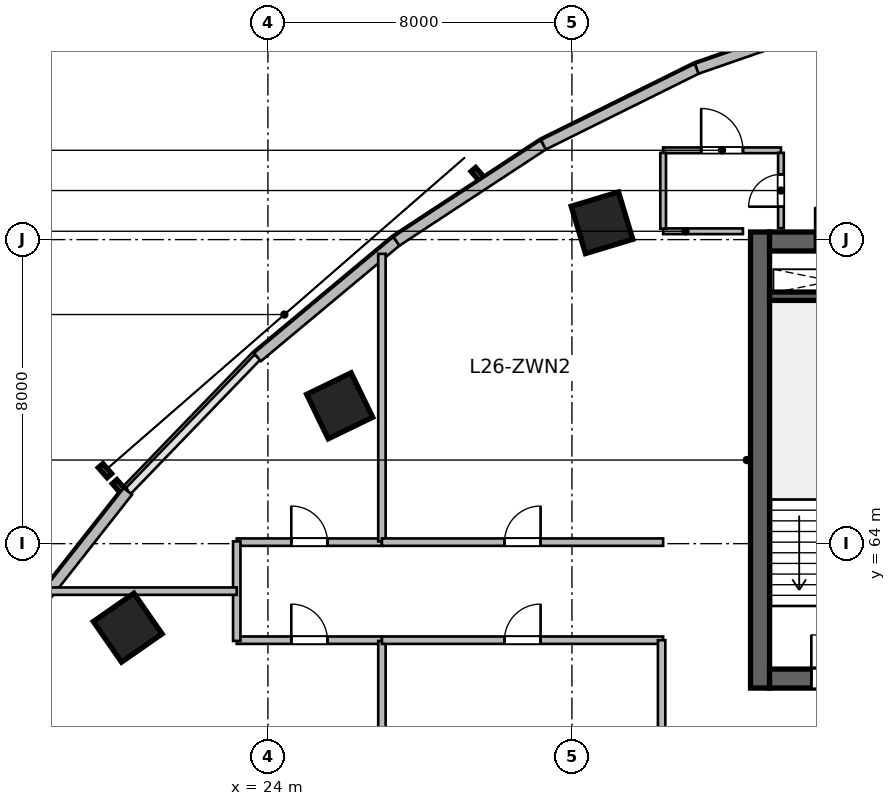
"""IFC4 building model, lengths in metres.
Left out: names, types, materials, properties, quantities, classifications, styles, units other than length and angle.
Written with IfcOpenShell. Run it as: python <this file> out.ifc"""

import sys

from ifc_helpers import new_model, si_unit, direction, frame, frame_2d, origin, origin_2d, place, context, subcontext, project, spatial, rectangle, extrude, source, transform, mapped, element, fill, save


model = new_model("IFC4")
c1 = context("Model", 3, precision=1e-05, world=origin(), true_north=direction((0.0, 1.0)))
c2 = subcontext(c1, "Body", "Model", "MODEL_VIEW")
j1 = project(units=[si_unit("LENGTHUNIT", "METRE"), si_unit("PLANEANGLEUNIT", "RADIAN")], contexts=[c1])
p1 = place(None, origin())
s1 = spatial("IfcSite", under=j1, at=p1, CompositionType="ELEMENT")
p2 = place(p1, origin())
s2 = spatial("IfcBuilding", under=s1, at=p2, CompositionType="ELEMENT")
p3 = place(p2, frame((0.0, 0.0, 111.6)))
s3 = spatial("IfcBuildingStorey", under=s2, at=p3, CompositionType="ELEMENT", Elevation=111.6)
m1 = source(origin(), c2, "Body", "SweptSolid", [
    extrude(rectangle(XDim=12.0, YDim=0.5, at=frame_2d((6.0, 0.0))), origin(), (0.0, 0.0, 1.0), 3.9),
])
p4 = place(p3, frame((36.95, 60.2, 0.0), z_axis=(0.0, 0.0, 1.0), x_axis=(0.0, 1.0, 0.0)))
e1 = element("IfcWall", 1, at=p4, inside=s3, PredefinedType="SHEAR", context=c2, shape_type="MappedRepresentation", body=[
    mapped(m1, transform((0.0, 0.0, 0.0), scale=1.0)),
])
m2 = source(origin(), c2, "Body", "SweptSolid", [
    extrude(rectangle(XDim=21.6, YDim=0.5, at=frame_2d((10.8, 0.0))), origin(), (0.0, 0.0, 1.0), 3.9),
])
p5 = place(p3, frame((37.2, 60.45, 0.0), z_axis=(0.0, 0.0, 1.0), x_axis=(1.0, 0.0, 0.0)))
e2 = element("IfcWall", 2, at=p5, inside=s3, PredefinedType="SHEAR", context=c2, shape_type="MappedRepresentation", body=[
    mapped(m2, transform((0.0, 0.0, 0.0), scale=1.0)),
])
p6 = place(p5, frame((1.1, 0.0, 0.0)))
e3 = element("IfcOpeningElement", 3, at=p6, cuts=e2, PredefinedType="OPENING", context=c2, shape_type="SweptSolid", body=[
    extrude(rectangle(XDim=1.15, YDim=2.15, at=frame_2d((0.575, 1.075))), frame((0.0, 0.26, 0.0), z_axis=(0.0, -1.0, 0.0), x_axis=(1.0, 0.0, 0.0)), (0.0, 0.0, 1.0), 0.52),
])
p7 = place(p5, frame((19.5, 0.0, 0.0)))
e4 = element("IfcOpeningElement", 4, at=p7, cuts=e2, PredefinedType="OPENING", context=c2, shape_type="SweptSolid", body=[
    extrude(rectangle(XDim=0.9, YDim=2.1, at=frame_2d((0.45, 1.05))), frame((0.0, 0.26, 0.0), z_axis=(0.0, -1.0, 0.0), x_axis=(1.0, 0.0, 0.0)), (0.0, 0.0, 1.0), 0.52),
])
p8 = place(p5, frame((12.02, 0.0, 0.0)))
e5 = element("IfcOpeningElement", 5, at=p8, cuts=e2, PredefinedType="OPENING", context=c2, shape_type="SweptSolid", body=[
    extrude(rectangle(XDim=1.6, YDim=2.15, at=frame_2d((0.8, 1.075))), frame((0.0, 0.26, 0.0), z_axis=(0.0, -1.0, 0.0), x_axis=(1.0, 0.0, 0.0)), (0.0, 0.0, 1.0), 0.52),
])
p9 = place(p3, frame((37.2, 71.95, 0.0), z_axis=(0.0, 0.0, 1.0), x_axis=(1.0, 0.0, 0.0)))
e6 = element("IfcWall", 6, at=p9, inside=s3, PredefinedType="SHEAR", context=c2, shape_type="MappedRepresentation", body=[
    mapped(m2, transform((0.0, 0.0, 0.0), scale=1.0)),
])
p10 = place(p9, frame((1.2, 0.0, 0.0)))
e7 = element("IfcOpeningElement", 7, at=p10, cuts=e6, PredefinedType="OPENING", context=c2, shape_type="SweptSolid", body=[
    extrude(rectangle(XDim=0.9, YDim=2.1, at=frame_2d((0.45, 1.05))), frame((0.0, 0.26, 0.0), z_axis=(0.0, -1.0, 0.0), x_axis=(1.0, 0.0, 0.0)), (0.0, 0.0, 1.0), 0.52),
])
p11 = place(p9, frame((14.7, 0.0, 0.0)))
e8 = element("IfcOpeningElement", 8, at=p11, cuts=e6, PredefinedType="OPENING", context=c2, shape_type="SweptSolid", body=[
    extrude(rectangle(XDim=1.2, YDim=2.15, at=frame_2d((0.6, 1.075))), frame((0.0, 0.26, 0.0), z_axis=(0.0, -1.0, 0.0), x_axis=(1.0, 0.0, 0.0)), (0.0, 0.0, 1.0), 0.52),
])
p12 = place(p9, frame((4.15, 0.0, 0.0)))
e9 = element("IfcOpeningElement", 9, at=p12, cuts=e6, PredefinedType="OPENING", context=c2, shape_type="SweptSolid", body=[
    extrude(rectangle(XDim=1.3, YDim=2.15, at=frame_2d((0.65, 1.075))), frame((0.0, 0.26, 0.0), z_axis=(0.0, -1.0, 0.0), x_axis=(1.0, 0.0, 0.0)), (0.0, 0.0, 1.0), 0.52),
])
p13 = place(p9, frame((6.76, 0.0, 0.0)))
e10 = element("IfcOpeningElement", 10, at=p13, cuts=e6, PredefinedType="OPENING", context=c2, shape_type="SweptSolid", body=[
    extrude(rectangle(XDim=0.85, YDim=2.1, at=frame_2d((0.425, 1.05))), frame((0.0, 0.26, 0.0), z_axis=(0.0, -1.0, 0.0), x_axis=(1.0, 0.0, 0.0)), (0.0, 0.0, 1.0), 0.52),
])
p14 = place(p9, frame((8.76, 0.0, 0.0)))
e11 = element("IfcOpeningElement", 11, at=p14, cuts=e6, PredefinedType="OPENING", context=c2, shape_type="SweptSolid", body=[
    extrude(rectangle(XDim=0.85, YDim=2.1, at=frame_2d((0.425, 1.05))), frame((0.0, 0.26, 0.0), z_axis=(0.0, -1.0, 0.0), x_axis=(1.0, 0.0, 0.0)), (0.0, 0.0, 1.0), 0.52),
])
p15 = place(p9, frame((10.725, 0.0, 0.0)))
e12 = element("IfcOpeningElement", 12, at=p15, cuts=e6, PredefinedType="OPENING", context=c2, shape_type="SweptSolid", body=[
    extrude(rectangle(XDim=0.85, YDim=2.1, at=frame_2d((0.425, 1.05))), frame((0.0, 0.26, 0.0), z_axis=(0.0, -1.0, 0.0), x_axis=(1.0, 0.0, 0.0)), (0.0, 0.0, 1.0), 0.52),
])
m3 = source(origin(), c2, "Body", "SweptSolid", [
    extrude(rectangle(XDim=3.27, YDim=0.22, at=frame_2d((1.635, 0.0))), origin(), (0.0, 0.0, 1.0), 3.9),
])
p16 = place(p3, frame((37.2, 70.51, 0.0), z_axis=(0.0, 0.0, 1.0), x_axis=(1.0, 0.0, 0.0)))
e13 = element("IfcWall", 13, at=p16, inside=s3, PredefinedType="SHEAR", context=c2, shape_type="MappedRepresentation", body=[
    mapped(m3, transform((0.0, 0.0, 0.0), scale=1.0)),
])
m4 = source(origin(), c2, "Body", "SweptSolid", [
    extrude(rectangle(XDim=1.3, YDim=1.3, at=origin_2d()), origin(), (0.0, 0.0, 1.0), 3.9),
])
for number, where, z_axis, x_axis in (
    (14, (20.311, 61.789, 0.0), (0.0, 0.0, 1.0), (-0.571, 0.821, 0.0)),
    (15, (25.888, 67.627, 0.0), (0.0, 0.0, 1.0), (-0.436, 0.9, 0.0)),
    (16, (32.791, 72.442, 0.0), (0.0, 0.0, 1.0), (-0.289, 0.957, 0.0)),
):
    element("IfcColumn", number, at=place(p3, frame(where, z_axis=z_axis, x_axis=x_axis)), inside=s3, PredefinedType="COLUMN", context=c2, shape_type="MappedRepresentation", body=[
        mapped(m4, transform((0.0, 0.0, 0.0), scale=1.0)),
    ])
m5 = source(origin(), c2, "Body", "SweptSolid", [
    extrude(rectangle(XDim=5.058, YDim=0.28, at=frame_2d((2.529, 0.0))), origin(), (0.0, 0.0, 1.0), 3.65),
])
p17 = place(p3, frame((17.188, 61.4, 0.0), z_axis=(0.0, 0.0, 1.0), x_axis=(0.618145507434, 0.786063694391, 0.0)))
e17 = element("IfcWall", 17, at=p17, inside=s3, PredefinedType="SOLIDWALL", context=c2, shape_type="MappedRepresentation", body=[
    mapped(m5, transform((0.0, 0.0, 0.0), scale=1.0)),
])
m6 = source(origin(), c2, "Body", "SweptSolid", [
    extrude(rectangle(XDim=4.762, YDim=0.28, at=frame_2d((2.381, 0.0))), origin(), (0.0, 0.0, 1.0), 3.65),
])
p18 = place(p3, frame((23.725, 68.907, 0.0), z_axis=(0.0, 0.0, 1.0), x_axis=(0.767952279762, 0.640507061638, 0.0)))
e18 = element("IfcWall", 18, at=p18, inside=s3, PredefinedType="SOLIDWALL", context=c2, shape_type="MappedRepresentation", body=[
    mapped(m6, transform((0.0, 0.0, 0.0), scale=1.0)),
])
m7 = source(origin(), c2, "Body", "SweptSolid", [
    extrude(rectangle(XDim=4.626, YDim=0.28, at=frame_2d((2.313, 0.0))), origin(), (0.0, 0.0, 1.0), 3.65),
])
p19 = place(p3, frame((27.382, 71.958, 0.0), z_axis=(0.0, 0.0, 1.0), x_axis=(0.83595938331, 0.548791316855, 0.0)))
e19 = element("IfcWall", 19, at=p19, inside=s3, PredefinedType="SOLIDWALL", context=c2, shape_type="MappedRepresentation", body=[
    mapped(m7, transform((0.0, 0.0, 0.0), scale=1.0)),
])
m8 = source(origin(), c2, "Body", "SweptSolid", [
    extrude(rectangle(XDim=4.506, YDim=0.28, at=frame_2d((2.253, 0.0))), origin(), (0.0, 0.0, 1.0), 3.65),
])
p20 = place(p3, frame((31.249, 74.496, 0.0), z_axis=(0.0, 0.0, 1.0), x_axis=(0.89597155075, 0.444111450254, 0.0)))
e20 = element("IfcWall", 20, at=p20, inside=s3, PredefinedType="SOLIDWALL", context=c2, shape_type="MappedRepresentation", body=[
    mapped(m8, transform((0.0, 0.0, 0.0), scale=1.0)),
])
m9 = source(origin(), c2, "Body", "SweptSolid", [
    extrude(rectangle(XDim=4.409, YDim=0.28, at=frame_2d((2.205, 0.0))), origin(), (0.0, 0.0, 1.0), 3.65),
])
p21 = place(p3, frame((35.286, 76.497, 0.0), z_axis=(0.0, 0.0, 1.0), x_axis=(0.944879374121, 0.327418643881, 0.0)))
e21 = element("IfcWall", 21, at=p21, inside=s3, PredefinedType="SOLIDWALL", context=c2, shape_type="MappedRepresentation", body=[
    mapped(m9, transform((0.0, 0.0, 0.0), scale=1.0)),
])
m10 = source(origin(), c2, "Body", "SweptSolid", [
    extrude(rectangle(XDim=2.1, YDim=0.15, at=frame_2d((1.05, 0.0))), origin(), (0.0, 0.0, 1.0), 3.65),
])
p22 = place(p3, frame((34.4, 72.22, 0.0), z_axis=(0.0, 0.0, 1.0), x_axis=(1.0, 0.0, 0.0)))
e22 = element("IfcWall", 22, at=p22, inside=s3, PredefinedType="PARTITIONING", context=c2, shape_type="MappedRepresentation", body=[
    mapped(m10, transform((0.0, 0.0, 0.0), scale=1.0)),
])
m11 = source(origin(), c2, "Body", "SweptSolid", [
    extrude(rectangle(XDim=3.1, YDim=0.15, at=frame_2d((1.55, 0.0))), origin(), (0.0, 0.0, 1.0), 3.022),
])
p23 = place(p3, frame((34.4, 74.35, 0.0), z_axis=(0.0, 0.0, 1.0), x_axis=(1.0, 0.0, 0.0)))
e23 = element("IfcWall", 23, at=p23, inside=s3, PredefinedType="PARTITIONING", context=c2, shape_type="MappedRepresentation", body=[
    mapped(m11, transform((0.0, 0.0, 0.0), scale=1.0)),
])
p24 = place(p23, frame((1.0, 0.0, 0.0)))
e24 = element("IfcOpeningElement", 24, at=p24, cuts=e23, PredefinedType="OPENING", context=c2, shape_type="SweptSolid", body=[
    extrude(rectangle(XDim=1.1, YDim=2.15, at=frame_2d((0.55, 1.075))), frame((0.0, 0.085, 0.0), z_axis=(0.0, -1.0, 0.0), x_axis=(1.0, 0.0, 0.0)), (0.0, 0.0, 1.0), 0.17),
])
m12 = source(origin(), c2, "Body", "SweptSolid", [
    extrude(rectangle(XDim=1.995, YDim=0.15, at=frame_2d((0.998, 0.0))), origin(), (0.0, 0.0, 1.0), 3.65),
])
p25 = place(p3, frame((34.4, 72.288, 0.0), z_axis=(0.0, 0.0, 1.0), x_axis=(0.0, 1.0, 0.0)))
e25 = element("IfcWall", 25, at=p25, inside=s3, PredefinedType="PARTITIONING", context=c2, shape_type="MappedRepresentation", body=[
    mapped(m12, transform((0.0, 0.0, 0.0), scale=1.0)),
])
m13 = source(origin(), c2, "Body", "SweptSolid", [
    extrude(rectangle(XDim=1.982, YDim=0.15, at=frame_2d((0.991, 0.0))), origin(), (0.0, 0.0, 1.0), 3.65),
])
p26 = place(p3, frame((37.5, 72.3, 0.0), z_axis=(0.0, 0.0, 1.0), x_axis=(0.0, 1.0, 0.0)))
e26 = element("IfcWall", 26, at=p26, inside=s3, PredefinedType="PARTITIONING", context=c2, shape_type="MappedRepresentation", body=[
    mapped(m13, transform((0.0, 0.0, 0.0), scale=1.0)),
])
p27 = place(p26, frame((0.566, 0.0, 0.0)))
e27 = element("IfcOpeningElement", 27, at=p27, cuts=e26, PredefinedType="OPENING", context=c2, shape_type="SweptSolid", body=[
    extrude(rectangle(XDim=0.85, YDim=2.1, at=frame_2d((0.425, 1.05))), frame((0.0, 0.085, 0.0), z_axis=(0.0, -1.0, 0.0), x_axis=(1.0, 0.0, 0.0)), (0.0, 0.0, 1.0), 0.17),
])
m14 = source(origin(), c2, "Body", "SweptSolid", [
    extrude(rectangle(XDim=3.82, YDim=0.195, at=frame_2d((1.91, 0.0))), origin(), (0.0, 0.0, 1.0), 3.65),
])
p28 = place(p3, frame((23.18, 64.04, 0.0), z_axis=(0.0, 0.0, 1.0), x_axis=(1.0, 0.0, 0.0)))
e28 = element("IfcWall", 28, at=p28, inside=s3, PredefinedType="PARTITIONING", context=c2, shape_type="MappedRepresentation", body=[
    mapped(m14, transform((0.0, 0.0, 0.0), scale=1.0)),
])
p29 = place(p28, frame((1.435, 0.0, 0.0)))
e29 = element("IfcOpeningElement", 29, at=p29, cuts=e28, PredefinedType="OPENING", context=c2, shape_type="SweptSolid", body=[
    extrude(rectangle(XDim=0.95, YDim=2.1, at=frame_2d((0.475, 1.05))), frame((0.0, 0.107, 0.0), z_axis=(0.0, -1.0, 0.0), x_axis=(1.0, 0.0, 0.0)), (0.0, 0.0, 1.0), 0.215),
])
m15 = source(origin(), c2, "Body", "SweptSolid", [
    extrude(rectangle(XDim=7.566, YDim=0.195, at=frame_2d((3.783, 0.0))), origin(), (0.0, 0.0, 1.0), 2.942),
])
p30 = place(p3, frame((27.0, 64.06, 0.0), z_axis=(0.0, 0.0, 1.0), x_axis=(0.0, 1.0, 0.0)))
e30 = element("IfcWall", 30, at=p30, inside=s3, PredefinedType="PARTITIONING", context=c2, shape_type="MappedRepresentation", body=[
    mapped(m15, transform((0.0, 0.0, 0.0), scale=1.0)),
])
m16 = source(origin(), c2, "Body", "SweptSolid", [
    extrude(rectangle(XDim=7.4, YDim=0.195, at=frame_2d((3.7, 0.0))), origin(), (0.0, 0.0, 1.0), 3.65),
])
p31 = place(p3, frame((27.0, 64.04, 0.0), z_axis=(0.0, 0.0, 1.0), x_axis=(1.0, 0.0, 0.0)))
e31 = element("IfcWall", 31, at=p31, inside=s3, PredefinedType="PARTITIONING", context=c2, shape_type="MappedRepresentation", body=[
    mapped(m16, transform((0.0, 0.0, 0.0), scale=1.0)),
])
p32 = place(p31, frame((3.225, 0.0, 0.0)))
e32 = element("IfcOpeningElement", 32, at=p32, cuts=e31, PredefinedType="OPENING", context=c2, shape_type="SweptSolid", body=[
    extrude(rectangle(XDim=0.95, YDim=2.1, at=frame_2d((0.475, 1.05))), frame((0.0, 0.107, 0.0), z_axis=(0.0, -1.0, 0.0), x_axis=(1.0, 0.0, 0.0)), (0.0, 0.0, 1.0), 0.215),
])
p33 = place(p3, frame((23.18, 61.46, 0.0), z_axis=(0.0, 0.0, 1.0), x_axis=(1.0, 0.0, 0.0)))
e33 = element("IfcWall", 33, at=p33, inside=s3, PredefinedType="PARTITIONING", context=c2, shape_type="MappedRepresentation", body=[
    mapped(m14, transform((0.0, 0.0, 0.0), scale=1.0)),
])
p34 = place(p33, frame((1.435, 0.0, 0.0)))
e34 = element("IfcOpeningElement", 34, at=p34, cuts=e33, PredefinedType="OPENING", context=c2, shape_type="SweptSolid", body=[
    extrude(rectangle(XDim=0.95, YDim=2.1, at=frame_2d((0.475, 1.05))), frame((0.0, 0.107, 0.0), z_axis=(0.0, -1.0, 0.0), x_axis=(1.0, 0.0, 0.0)), (0.0, 0.0, 1.0), 0.215),
])
m17 = source(origin(), c2, "Body", "SweptSolid", [
    extrude(rectangle(XDim=23.771, YDim=0.195, at=frame_2d((11.886, 0.0))), origin(), (0.0, 0.0, 1.0), 2.942),
])
p35 = place(p3, frame((27.0, 37.668, 0.0), z_axis=(0.0, 0.0, 1.0), x_axis=(0.0, 1.0, 0.0)))
e35 = element("IfcWall", 35, at=p35, inside=s3, PredefinedType="PARTITIONING", context=c2, shape_type="MappedRepresentation", body=[
    mapped(m17, transform((0.0, 0.0, 0.0), scale=1.0)),
])
p36 = place(p3, frame((27.0, 61.46, 0.0), z_axis=(0.0, 0.0, 1.0), x_axis=(1.0, 0.0, 0.0)))
e36 = element("IfcWall", 36, at=p36, inside=s3, PredefinedType="PARTITIONING", context=c2, shape_type="MappedRepresentation", body=[
    mapped(m16, transform((0.0, 0.0, 0.0), scale=1.0)),
])
p37 = place(p36, frame((3.225, 0.0, 0.0)))
e37 = element("IfcOpeningElement", 37, at=p37, cuts=e36, PredefinedType="OPENING", context=c2, shape_type="SweptSolid", body=[
    extrude(rectangle(XDim=0.95, YDim=2.1, at=frame_2d((0.475, 1.05))), frame((0.0, 0.107, 0.0), z_axis=(0.0, -1.0, 0.0), x_axis=(1.0, 0.0, 0.0)), (0.0, 0.0, 1.0), 0.215),
])
m18 = source(origin(), c2, "Body", "SweptSolid", [
    extrude(rectangle(XDim=13.988, YDim=0.195, at=frame_2d((6.994, 0.0))), origin(), (0.0, 0.0, 1.0), 3.65),
])
p38 = place(p3, frame((34.36, 47.472, 0.0), z_axis=(0.0, 0.0, 1.0), x_axis=(0.0, 1.0, 0.0)))
e38 = element("IfcWall", 38, at=p38, inside=s3, PredefinedType="PARTITIONING", context=c2, shape_type="MappedRepresentation", body=[
    mapped(m18, transform((0.0, 0.0, 0.0), scale=1.0)),
])
m19 = source(origin(), c2, "Body", "SweptSolid", [
    extrude(rectangle(XDim=2.62, YDim=0.195, at=frame_2d((1.31, 0.0))), origin(), (0.0, 0.0, 1.0), 3.65),
])
p39 = place(p3, frame((23.18, 61.44, 0.0), z_axis=(0.0, 0.0, 1.0), x_axis=(0.0, 1.0, 0.0)))
e39 = element("IfcWall", 39, at=p39, inside=s3, PredefinedType="PARTITIONING", context=c2, shape_type="MappedRepresentation", body=[
    mapped(m19, transform((0.0, 0.0, 0.0), scale=1.0)),
])
m20 = source(origin(), c2, "Body", "SweptSolid", [
    extrude(rectangle(XDim=4.917, YDim=0.195, at=frame_2d((2.459, 0.0))), origin(), (0.0, 0.0, 1.0), 3.65),
])
p40 = place(p3, frame((18.262, 62.75, 0.0), z_axis=(0.0, 0.0, 1.0), x_axis=(1.0, 0.0, 0.0)))
e40 = element("IfcWall", 40, at=p40, inside=s3, PredefinedType="PARTITIONING", context=c2, shape_type="MappedRepresentation", body=[
    mapped(m20, transform((0.0, 0.0, 0.0), scale=1.0)),
])
m21 = source(origin(), c2, "Body", "SweptSolid", [
    extrude(rectangle(XDim=1.15, YDim=2.15, at=frame_2d((0.575, 1.075))), frame((0.0, 0.025, 0.0), z_axis=(0.0, -1.0, 0.0), x_axis=(1.0, 0.0, 0.0)), (0.0, 0.0, 1.0), 0.05),
])
p41 = place(p6, origin())
e41 = element("IfcDoor", 41, at=p41, inside=s3, OperationType="SINGLE_SWING_LEFT", PredefinedType="DOOR", context=c2, shape_type="MappedRepresentation", body=[
    mapped(m21, transform((0.0, 0.0, 0.0), scale=1.0)),
])
fill(e3, e41)
m22 = source(origin(), c2, "Body", "SweptSolid", [
    extrude(rectangle(XDim=0.9, YDim=2.1, at=frame_2d((0.45, 1.05))), frame((0.0, 0.025, 0.0), z_axis=(0.0, -1.0, 0.0), x_axis=(1.0, 0.0, 0.0)), (0.0, 0.0, 1.0), 0.05),
])
p42 = place(p10, origin())
e42 = element("IfcDoor", 42, at=p42, inside=s3, OperationType="SINGLE_SWING_LEFT", PredefinedType="DOOR", context=c2, shape_type="MappedRepresentation", body=[
    mapped(m22, transform((0.0, 0.0, 0.0), scale=1.0)),
])
fill(e7, e42)
m23 = source(origin(), c2, "Body", "SweptSolid", [
    extrude(rectangle(XDim=0.85, YDim=2.1, at=frame_2d((0.425, 1.05))), frame((0.0, 0.025, 0.0), z_axis=(0.0, -1.0, 0.0), x_axis=(1.0, 0.0, 0.0)), (0.0, 0.0, 1.0), 0.05),
])
p43 = place(p27, origin())
e43 = element("IfcDoor", 43, at=p43, inside=s3, OperationType="SINGLE_SWING_LEFT", PredefinedType="DOOR", context=c2, shape_type="MappedRepresentation", body=[
    mapped(m23, transform((0.0, 0.0, 0.0), scale=1.0)),
])
fill(e27, e43)
m24 = source(origin(), c2, "Body", "SweptSolid", [
    extrude(rectangle(XDim=1.1, YDim=2.15, at=frame_2d((0.55, 1.075))), frame((0.0, 0.025, 0.0), z_axis=(0.0, -1.0, 0.0), x_axis=(1.0, 0.0, 0.0)), (0.0, 0.0, 1.0), 0.05),
])
p44 = place(p24, origin())
e44 = element("IfcDoor", 44, at=p44, inside=s3, OperationType="SINGLE_SWING_LEFT", PredefinedType="DOOR", context=c2, shape_type="MappedRepresentation", body=[
    mapped(m24, transform((0.0, 0.0, 0.0), scale=1.0)),
])
fill(e24, e44)
m25 = source(origin(), c2, "Body", "SweptSolid", [
    extrude(rectangle(XDim=0.95, YDim=2.1, at=frame_2d((0.475, 1.05))), frame((0.0, 0.025, 0.0), z_axis=(0.0, -1.0, 0.0), x_axis=(1.0, 0.0, 0.0)), (0.0, 0.0, 1.0), 0.05),
])
p45 = place(p29, origin())
e45 = element("IfcDoor", 45, at=p45, inside=s3, OperationType="SINGLE_SWING_LEFT", PredefinedType="DOOR", context=c2, shape_type="MappedRepresentation", body=[
    mapped(m25, transform((0.0, 0.0, 0.0), scale=1.0)),
])
fill(e29, e45)
p46 = place(p32, origin())
e46 = element("IfcDoor", 46, at=p46, inside=s3, OperationType="SINGLE_SWING_RIGHT", PredefinedType="DOOR", context=c2, shape_type="MappedRepresentation", body=[
    mapped(m25, transform((0.0, 0.0, 0.0), scale=1.0)),
])
fill(e32, e46)
p47 = place(p34, origin())
e47 = element("IfcDoor", 47, at=p47, inside=s3, OperationType="SINGLE_SWING_LEFT", PredefinedType="DOOR", context=c2, shape_type="MappedRepresentation", body=[
    mapped(m25, transform((0.0, 0.0, 0.0), scale=1.0)),
])
fill(e34, e47)
p48 = place(p37, origin())
e48 = element("IfcDoor", 48, at=p48, inside=s3, OperationType="SINGLE_SWING_RIGHT", PredefinedType="DOOR", context=c2, shape_type="MappedRepresentation", body=[
    mapped(m25, transform((0.0, 0.0, 0.0), scale=1.0)),
])
fill(e37, e48)
save(model, sys.argv[1])
